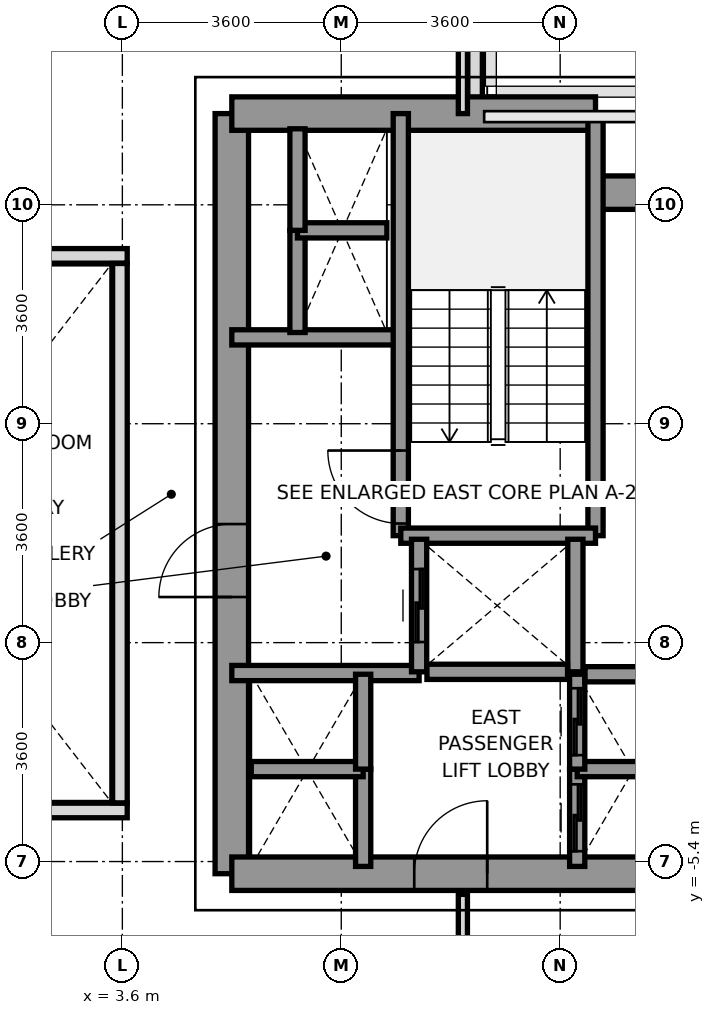
"""IFC4 building model, lengths in metres.
Left out: names, types, materials, properties, quantities, classifications, styles, units other than length and angle.
Written with IfcOpenShell. Run it as: python <this file> out.ifc"""

import sys

from ifc_helpers import new_model, si_unit, direction, frame, frame_2d, origin, place, context, subcontext, project, spatial, rectangle, extrude, source, transform, mapped, element, fill, save


model = new_model("IFC4")
c1 = context("Model", 3, precision=1e-05, world=origin(), true_north=direction((0.0, 1.0)))
c2 = subcontext(c1, "Body", "Model", "MODEL_VIEW")
j1 = project(units=[si_unit("LENGTHUNIT", "METRE"), si_unit("PLANEANGLEUNIT", "RADIAN")], contexts=[c1])
p1 = place(None, origin())
s1 = spatial("IfcSite", under=j1, at=p1, CompositionType="ELEMENT")
p2 = place(p1, origin())
s2 = spatial("IfcBuilding", under=s1, at=p2, CompositionType="ELEMENT")
p3 = place(p2, frame((0.0, 0.0, 81.6)))
s3 = spatial("IfcBuildingStorey", under=s2, at=p3, CompositionType="ELEMENT", Elevation=81.6)
p4 = place(p3, frame((9.4, 8.397, 0.0), z_axis=(0.0, 0.0, 1.0), x_axis=(0.0, -1.0, 0.0)))
e1 = element("IfcWall", 1, at=p4, inside=s3, PredefinedType="PARAPET", context=c2, shape_type="SweptSolid", body=[
    extrude(rectangle(XDim=1.444, YDim=0.24, at=frame_2d((0.722, 0.0))), origin(), (0.0, 0.0, 1.0), 1.15),
])
p5 = place(p3, frame((5.4, -5.6, 0.0), z_axis=(0.0, 0.0, 1.0), x_axis=(0.0, 1.0, 0.0)))
e2 = element("IfcWall", 2, at=p5, inside=s3, PredefinedType="SHEAR", context=c2, shape_type="SweptSolid", body=[
    extrude(rectangle(XDim=12.5, YDim=0.55, at=frame_2d((6.25, 0.0))), origin(), (0.0, 0.0, 1.0), 3.2),
])
p6 = place(p5, frame((4.55, 0.0, 0.0)))
e3 = element("IfcOpeningElement", 3, at=p6, cuts=e2, PredefinedType="OPENING", context=c2, shape_type="SweptSolid", body=[
    extrude(rectangle(XDim=1.2, YDim=2.2, at=frame_2d((0.6, 1.1))), frame((0.0, 0.285, 0.0), z_axis=(0.0, -1.0, 0.0), x_axis=(1.0, 0.0, 0.0)), (0.0, 0.0, 1.0), 0.57),
])
p7 = place(p3, frame((5.4, 6.9, 0.0), z_axis=(0.0, 0.0, 1.0), x_axis=(1.0, 0.0, 0.0)))
e4 = element("IfcWall", 4, at=p7, inside=s3, PredefinedType="SHEAR", context=c2, shape_type="SweptSolid", body=[
    extrude(rectangle(XDim=5.981, YDim=0.55, at=frame_2d((2.991, 0.0))), origin(), (0.0, 0.0, 1.0), 3.2),
])
p8 = place(p3, frame((11.381, 5.6, 0.0), z_axis=(0.0, 0.0, 1.0), x_axis=(1.0, 0.0, 0.0)))
e5 = element("IfcWall", 5, at=p8, inside=s3, PredefinedType="SHEAR", context=c2, shape_type="SweptSolid", body=[
    extrude(rectangle(XDim=1.819, YDim=0.55, at=frame_2d((0.909, 0.0))), origin(), (0.0, 0.0, 1.0), 3.2),
])
p9 = place(p3, frame((5.4, -5.6, 0.0), z_axis=(0.0, 0.0, 1.0), x_axis=(1.0, 0.0, 0.0)))
e6 = element("IfcWall", 6, at=p9, inside=s3, PredefinedType="SHEAR", context=c2, shape_type="SweptSolid", body=[
    extrude(rectangle(XDim=7.8, YDim=0.55, at=frame_2d((3.9, 0.0))), origin(), (0.0, 0.0, 1.0), 3.2),
])
p10 = place(p9, frame((3.0, 0.0, 0.0)))
e7 = element("IfcOpeningElement", 7, at=p10, cuts=e6, PredefinedType="OPENING", context=c2, shape_type="SweptSolid", body=[
    extrude(rectangle(XDim=1.2, YDim=2.2, at=frame_2d((0.6, 1.1))), frame((0.0, 0.285, 0.0), z_axis=(0.0, -1.0, 0.0), x_axis=(1.0, 0.0, 0.0)), (0.0, 0.0, 1.0), 0.57),
])
p11 = place(p3, frame((5.4, 3.22, 0.0), z_axis=(0.0, 0.0, 1.0), x_axis=(1.0, 0.0, 0.0)))
e8 = element("IfcWall", 8, at=p11, inside=s3, PredefinedType="SOLIDWALL", context=c2, shape_type="SweptSolid", body=[
    extrude(rectangle(XDim=2.78, YDim=0.25, at=frame_2d((1.39, 0.0))), origin(), (0.0, 0.0, 1.0), 3.2),
])
p12 = place(p3, frame((5.4, -2.3, 0.0), z_axis=(0.0, 0.0, 1.0), x_axis=(1.0, 0.0, 0.0)))
e9 = element("IfcWall", 9, at=p12, inside=s3, PredefinedType="SOLIDWALL", context=c2, shape_type="SweptSolid", body=[
    extrude(rectangle(XDim=3.08, YDim=0.25, at=frame_2d((1.54, 0.0))), origin(), (0.0, 0.0, 1.0), 3.2),
])
p13 = place(p3, frame((8.179, -0.041, 0.0), z_axis=(0.0, 0.0, 1.0), x_axis=(0.0, 1.0, 0.0)))
e10 = element("IfcWall", 10, at=p13, inside=s3, PredefinedType="SOLIDWALL", context=c2, shape_type="SweptSolid", body=[
    extrude(rectangle(XDim=6.941, YDim=0.25, at=frame_2d((3.47, 0.0))), origin(), (0.0, 0.0, 1.0), 3.2),
])
p14 = place(p13, frame((0.2, 0.0, 0.0)))
e11 = element("IfcOpeningElement", 11, at=p14, cuts=e10, PredefinedType="OPENING", context=c2, shape_type="SweptSolid", body=[
    extrude(rectangle(XDim=1.2, YDim=2.2, at=frame_2d((0.6, 1.1))), frame((0.0, 0.135, 0.0), z_axis=(0.0, -1.0, 0.0), x_axis=(1.0, 0.0, 0.0)), (0.0, 0.0, 1.0), 0.27),
])
p15 = place(p3, frame((11.381, -0.041, 0.0), z_axis=(0.0, 0.0, 1.0), x_axis=(0.0, 1.0, 0.0)))
e12 = element("IfcWall", 12, at=p15, inside=s3, PredefinedType="SOLIDWALL", context=c2, shape_type="SweptSolid", body=[
    extrude(rectangle(XDim=6.941, YDim=0.25, at=frame_2d((3.47, 0.0))), origin(), (0.0, 0.0, 1.0), 3.2),
])
p16 = place(p3, frame((8.179, -0.041, 0.0), z_axis=(0.0, 0.0, 1.0), x_axis=(1.0, 0.0, 0.0)))
e13 = element("IfcWall", 13, at=p16, inside=s3, PredefinedType="SOLIDWALL", context=c2, shape_type="SweptSolid", body=[
    extrude(rectangle(XDim=3.202, YDim=0.25, at=frame_2d((1.601, 0.0))), origin(), (0.0, 0.0, 1.0), 3.2),
])
p17 = place(p3, frame((8.48, -2.28, 0.0), z_axis=(0.0, 0.0, 1.0), x_axis=(0.0, 1.0, 0.0)))
e14 = element("IfcWall", 14, at=p17, inside=s3, PredefinedType="SOLIDWALL", context=c2, shape_type="SweptSolid", body=[
    extrude(rectangle(XDim=2.18, YDim=0.25, at=frame_2d((1.09, 0.0))), origin(), (0.0, 0.0, 1.0), 3.2),
])
p18 = place(p17, frame((0.49, 0.0, 0.0)))
e15 = element("IfcOpeningElement", 15, at=p18, cuts=e14, PredefinedType="OPENING", context=c2, shape_type="SweptSolid", body=[
    extrude(rectangle(XDim=1.2, YDim=2.2, at=frame_2d((0.6, 1.1))), frame((0.0, 0.135, 0.0), z_axis=(0.0, -1.0, 0.0), x_axis=(1.0, 0.0, 0.0)), (0.0, 0.0, 1.0), 0.27),
])
p19 = place(p3, frame((11.05, -2.28, 0.0), z_axis=(0.0, 0.0, 1.0), x_axis=(0.0, 1.0, 0.0)))
e16 = element("IfcWall", 16, at=p19, inside=s3, PredefinedType="SOLIDWALL", context=c2, shape_type="SweptSolid", body=[
    extrude(rectangle(XDim=2.18, YDim=0.25, at=frame_2d((1.09, 0.0))), origin(), (0.0, 0.0, 1.0), 3.2),
])
p20 = place(p3, frame((8.609, -2.28, 0.0), z_axis=(0.0, 0.0, 1.0), x_axis=(1.0, 0.0, 0.0)))
e17 = element("IfcWall", 17, at=p20, inside=s3, PredefinedType="SOLIDWALL", context=c2, shape_type="SweptSolid", body=[
    extrude(rectangle(XDim=2.312, YDim=0.25, at=frame_2d((1.156, 0.0))), origin(), (0.0, 0.0, 1.0), 3.2),
])
p21 = place(p3, frame((11.08, -5.48, 0.0), z_axis=(0.0, 0.0, 1.0), x_axis=(0.0, 1.0, 0.0)))
e18 = element("IfcWall", 18, at=p21, inside=s3, PredefinedType="SOLIDWALL", context=c2, shape_type="SweptSolid", body=[
    extrude(rectangle(XDim=1.6, YDim=0.25, at=frame_2d((0.8, 0.0))), origin(), (0.0, 0.0, 1.0), 3.2),
])
p22 = place(p21, frame((0.25, 0.0, 0.0)))
e19 = element("IfcOpeningElement", 19, at=p22, cuts=e18, PredefinedType="OPENING", context=c2, shape_type="SweptSolid", body=[
    extrude(rectangle(XDim=1.1, YDim=2.2, at=frame_2d((0.55, 1.1))), frame((0.0, 0.135, 0.0), z_axis=(0.0, -1.0, 0.0), x_axis=(1.0, 0.0, 0.0)), (0.0, 0.0, 1.0), 0.27),
])
p23 = place(p3, frame((11.08, -3.88, 0.0), z_axis=(0.0, 0.0, 1.0), x_axis=(1.0, 0.0, 0.0)))
e20 = element("IfcWall", 20, at=p23, inside=s3, PredefinedType="SOLIDWALL", context=c2, shape_type="SweptSolid", body=[
    extrude(rectangle(XDim=1.84, YDim=0.25, at=frame_2d((0.92, 0.0))), origin(), (0.0, 0.0, 1.0), 3.2),
])
p24 = place(p3, frame((11.08, -3.88, 0.0), z_axis=(0.0, 0.0, 1.0), x_axis=(0.0, 1.0, 0.0)))
e21 = element("IfcWall", 21, at=p24, inside=s3, PredefinedType="SOLIDWALL", context=c2, shape_type="SweptSolid", body=[
    extrude(rectangle(XDim=1.56, YDim=0.25, at=frame_2d((0.78, 0.0))), origin(), (0.0, 0.0, 1.0), 3.2),
])
p25 = place(p24, frame((0.23, 0.0, 0.0)))
e22 = element("IfcOpeningElement", 22, at=p25, cuts=e21, PredefinedType="OPENING", context=c2, shape_type="SweptSolid", body=[
    extrude(rectangle(XDim=1.1, YDim=2.2, at=frame_2d((0.55, 1.1))), frame((0.0, 0.135, 0.0), z_axis=(0.0, -1.0, 0.0), x_axis=(1.0, 0.0, 0.0)), (0.0, 0.0, 1.0), 0.27),
])
p26 = place(p3, frame((11.209, -2.32, 0.0), z_axis=(0.0, 0.0, 1.0), x_axis=(1.0, 0.0, 0.0)))
e23 = element("IfcWall", 23, at=p26, inside=s3, PredefinedType="SOLIDWALL", context=c2, shape_type="SweptSolid", body=[
    extrude(rectangle(XDim=1.582, YDim=0.25, at=frame_2d((0.791, 0.0))), origin(), (0.0, 0.0, 1.0), 3.2),
])
p27 = place(p3, frame((7.56, -5.48, 0.0), z_axis=(0.0, 0.0, 1.0), x_axis=(0.0, 1.0, 0.0)))
e24 = element("IfcWall", 24, at=p27, inside=s3, PredefinedType="SOLIDWALL", context=c2, shape_type="SweptSolid", body=[
    extrude(rectangle(XDim=1.6, YDim=0.25, at=frame_2d((0.8, 0.0))), origin(), (0.0, 0.0, 1.0), 3.2),
])
p28 = place(p3, frame((5.72, -3.88, 0.0), z_axis=(0.0, 0.0, 1.0), x_axis=(1.0, 0.0, 0.0)))
e25 = element("IfcWall", 25, at=p28, inside=s3, PredefinedType="SOLIDWALL", context=c2, shape_type="SweptSolid", body=[
    extrude(rectangle(XDim=1.84, YDim=0.25, at=frame_2d((0.92, 0.0))), origin(), (0.0, 0.0, 1.0), 3.2),
])
p29 = place(p3, frame((7.56, -3.88, 0.0), z_axis=(0.0, 0.0, 1.0), x_axis=(0.0, 1.0, 0.0)))
e26 = element("IfcWall", 26, at=p29, inside=s3, PredefinedType="SOLIDWALL", context=c2, shape_type="SweptSolid", body=[
    extrude(rectangle(XDim=1.56, YDim=0.25, at=frame_2d((0.78, 0.0))), origin(), (0.0, 0.0, 1.0), 3.2),
])
p30 = place(p3, frame((6.48, 3.3, 0.0), z_axis=(0.0, 0.0, 1.0), x_axis=(0.0, 1.0, 0.0)))
e27 = element("IfcWall", 27, at=p30, inside=s3, PredefinedType="SOLIDWALL", context=c2, shape_type="SweptSolid", body=[
    extrude(rectangle(XDim=1.68, YDim=0.25, at=frame_2d((0.84, 0.0))), origin(), (0.0, 0.0, 1.0), 3.2),
])
p31 = place(p3, frame((6.48, 4.98, 0.0), z_axis=(0.0, 0.0, 1.0), x_axis=(1.0, 0.0, 0.0)))
e28 = element("IfcWall", 28, at=p31, inside=s3, PredefinedType="SOLIDWALL", context=c2, shape_type="SweptSolid", body=[
    extrude(rectangle(XDim=1.47, YDim=0.25, at=frame_2d((0.735, 0.0))), origin(), (0.0, 0.0, 1.0), 3.2),
])
p32 = place(p3, frame((6.48, 4.98, 0.0), z_axis=(0.0, 0.0, 1.0), x_axis=(0.0, 1.0, 0.0)))
e29 = element("IfcWall", 29, at=p32, inside=s3, PredefinedType="SOLIDWALL", context=c2, shape_type="SweptSolid", body=[
    extrude(rectangle(XDim=1.67, YDim=0.25, at=frame_2d((0.835, 0.0))), origin(), (0.0, 0.0, 1.0), 3.2),
])
p33 = place(p3, frame((9.2, 6.9, 0.0), z_axis=(0.0, 0.0, 1.0), x_axis=(0.0, 1.0, 0.0)))
e30 = element("IfcWall", 30, at=p33, inside=s3, PredefinedType="PARTITIONING", context=c2, shape_type="SweptSolid", body=[
    extrude(rectangle(XDim=8.78, YDim=0.15, at=frame_2d((4.39, 0.0))), origin(), (0.0, 0.0, 1.0), 2.71),
])
p34 = place(p3, frame((9.2, -15.68, 0.0), z_axis=(0.0, 0.0, 1.0), x_axis=(0.0, 1.0, 0.0)))
e31 = element("IfcWall", 31, at=p34, inside=s3, PredefinedType="PARTITIONING", context=c2, shape_type="SweptSolid", body=[
    extrude(rectangle(XDim=9.74, YDim=0.15, at=frame_2d((4.87, 0.0))), origin(), (0.0, 0.0, 1.0), 2.71),
])
for number, where, z_axis, x_axis in (
    (32, (-3.68, -4.56, 0.0), (0.0, 0.0, 1.0), (1.0, 0.0, 0.0)),
    (33, (-3.68, 4.56, 0.0), (0.0, 0.0, 1.0), (1.0, 0.0, 0.0)),
):
    element("IfcWall", number, at=place(p3, frame(where, z_axis=z_axis, x_axis=x_axis)), inside=s3, PredefinedType="PARAPET", context=c2, shape_type="SweptSolid", body=[
        extrude(rectangle(XDim=7.36, YDim=0.24, at=frame_2d((3.68, 0.0))), origin(), (0.0, 0.0, 1.0), 1.15),
    ])
p35 = place(p3, frame((3.56, -4.435, 0.0), z_axis=(0.0, 0.0, 1.0), x_axis=(0.0, 1.0, 0.0)))
e34 = element("IfcWall", 34, at=p35, inside=s3, PredefinedType="PARAPET", context=c2, shape_type="SweptSolid", body=[
    extrude(rectangle(XDim=8.87, YDim=0.24, at=frame_2d((4.435, 0.0))), origin(), (0.0, 0.0, 1.0), 1.15),
])
m1 = source(origin(), c2, "Body", "SweptSolid", [
    extrude(rectangle(XDim=1.2, YDim=2.2, at=frame_2d((0.6, 1.1))), frame((0.0, 0.025, 0.0), z_axis=(0.0, -1.0, 0.0), x_axis=(1.0, 0.0, 0.0)), (0.0, 0.0, 1.0), 0.05),
])
p36 = place(p14, origin())
e35 = element("IfcDoor", 35, at=p36, inside=s3, OperationType="SINGLE_SWING_RIGHT", PredefinedType="DOOR", context=c2, shape_type="MappedRepresentation", body=[
    mapped(m1, transform((0.0, 0.0, 0.0), x_axis=(1.0, 0.0, 0.0), y_axis=(0.0, 1.0, 0.0), z_axis=(0.0, 0.0, 1.0), scale=1.0)),
])
fill(e11, e35)
p37 = place(p6, origin())
e36 = element("IfcDoor", 36, at=p37, inside=s3, OperationType="SINGLE_SWING_LEFT", PredefinedType="DOOR", context=c2, shape_type="MappedRepresentation", body=[
    mapped(m1, transform((0.0, 0.0, 0.0), x_axis=(1.0, 0.0, 0.0), y_axis=(0.0, 1.0, 0.0), z_axis=(0.0, 0.0, 1.0), scale=1.0)),
])
fill(e3, e36)
p38 = place(p10, origin())
e37 = element("IfcDoor", 37, at=p38, inside=s3, OperationType="SINGLE_SWING_RIGHT", PredefinedType="DOOR", context=c2, shape_type="MappedRepresentation", body=[
    mapped(m1, transform((0.0, 0.0, 0.0), x_axis=(1.0, 0.0, 0.0), y_axis=(0.0, 1.0, 0.0), z_axis=(0.0, 0.0, 1.0), scale=1.0)),
])
fill(e7, e37)
p39 = place(p18, origin())
e38 = element("IfcDoor", 38, at=p39, inside=s3, OperationType="SLIDING_TO_RIGHT", PredefinedType="DOOR", context=c2, shape_type="MappedRepresentation", body=[
    mapped(m1, transform((0.0, 0.0, 0.0), x_axis=(1.0, 0.0, 0.0), y_axis=(0.0, 1.0, 0.0), z_axis=(0.0, 0.0, 1.0), scale=1.0)),
])
fill(e15, e38)
m2 = source(origin(), c2, "Body", "SweptSolid", [
    extrude(rectangle(XDim=1.1, YDim=2.2, at=frame_2d((0.55, 1.1))), frame((0.0, 0.025, 0.0), z_axis=(0.0, -1.0, 0.0), x_axis=(1.0, 0.0, 0.0)), (0.0, 0.0, 1.0), 0.05),
])
p40 = place(p22, origin())
e39 = element("IfcDoor", 39, at=p40, inside=s3, OperationType="SLIDING_TO_LEFT", PredefinedType="DOOR", context=c2, shape_type="MappedRepresentation", body=[
    mapped(m2, transform((0.0, 0.0, 0.0), x_axis=(1.0, 0.0, 0.0), y_axis=(0.0, 1.0, 0.0), z_axis=(0.0, 0.0, 1.0), scale=1.0)),
])
fill(e19, e39)
p41 = place(p25, origin())
e40 = element("IfcDoor", 40, at=p41, inside=s3, OperationType="SLIDING_TO_LEFT", PredefinedType="DOOR", context=c2, shape_type="MappedRepresentation", body=[
    mapped(m2, transform((0.0, 0.0, 0.0), x_axis=(1.0, 0.0, 0.0), y_axis=(0.0, 1.0, 0.0), z_axis=(0.0, 0.0, 1.0), scale=1.0)),
])
fill(e22, e40)
save(model, sys.argv[1])
